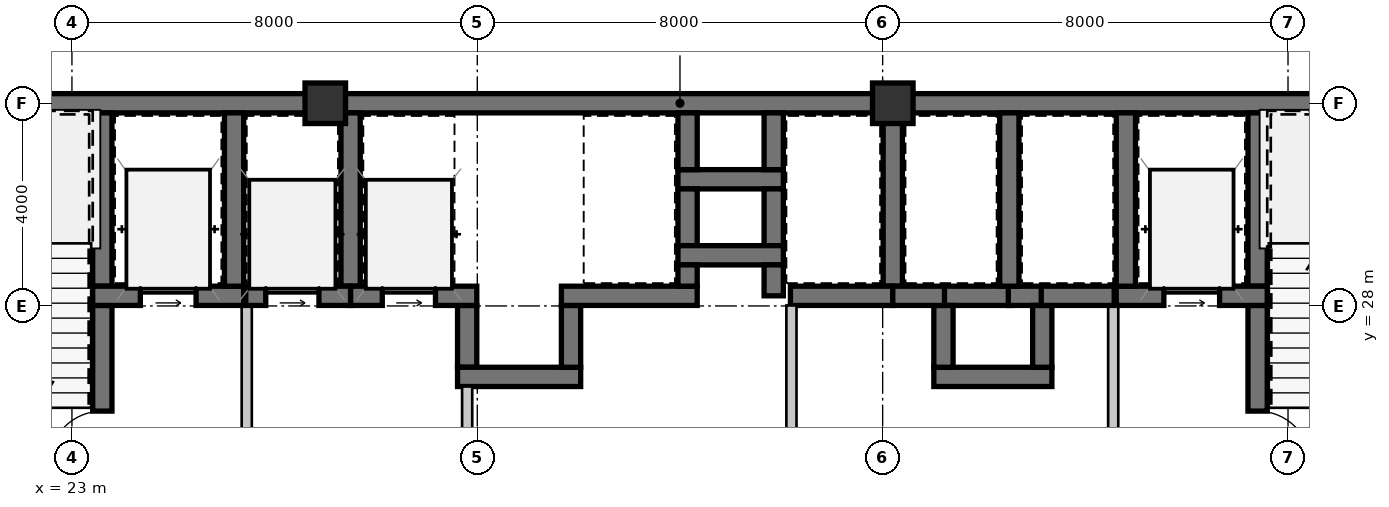
"""IFC4 building model, lengths in metres.
Left out: names, types, materials, properties, quantities, classifications, styles, units other than length and angle.
Written with IfcOpenShell. Run it as: python <this file> out.ifc"""

import sys

from ifc_helpers import new_model, si_unit, direction, frame, frame_2d, origin, origin_2d, place, context, subcontext, project, spatial, rectangle, extrude, source, transform, mapped, element, fill, save


model = new_model("IFC4")
c1 = context("Model", 3, precision=1e-05, world=origin(), true_north=direction((0.0, 1.0)))
c2 = subcontext(c1, "Body", "Model", "MODEL_VIEW")
j1 = project(units=[si_unit("LENGTHUNIT", "METRE"), si_unit("PLANEANGLEUNIT", "RADIAN")], contexts=[c1])
p1 = place(None, origin())
s1 = spatial("IfcSite", under=j1, at=p1, CompositionType="ELEMENT")
p2 = place(p1, origin())
s2 = spatial("IfcBuilding", under=s1, at=p2, CompositionType="ELEMENT")
p3 = place(p2, frame((0.0, 0.0, 32.55)))
s3 = spatial("IfcBuildingStorey", under=s2, at=p3, CompositionType="ELEMENT", Elevation=32.55)
m1 = source(origin(), c2, "Body", "SweptSolid", [
    extrude(rectangle(XDim=0.8, YDim=0.8, at=origin_2d()), origin(), (0.0, 0.0, 1.0), 3.15),
])
for number, where, z_axis, x_axis in (
    (1, (28.0, 32.0, 0.0), (0.0, 0.0, 1.0), (1.0, 0.0, 0.0)),
    (2, (39.2, 32.0, 0.0), (0.0, 0.0, 1.0), (1.0, 0.0, 0.0)),
):
    element("IfcColumn", number, at=place(p3, frame(where, z_axis=z_axis, x_axis=x_axis)), inside=s3, PredefinedType="COLUMN", context=c2, shape_type="MappedRepresentation", body=[
        mapped(m1, transform((0.0, 0.0, 0.0), scale=1.0)),
    ])
m2 = source(origin(), c2, "Body", "SweptSolid", [
    extrude(rectangle(XDim=9.19, YDim=0.38, at=frame_2d((4.595, 0.0))), origin(), (0.0, 0.0, 1.0), 2.93),
])
p4 = place(p3, frame((18.81, 32.0, 0.0), z_axis=(0.0, 0.0, 1.0), x_axis=(1.0, 0.0, 0.0)))
e3 = element("IfcWall", 3, at=p4, inside=s3, PredefinedType="SHEAR", context=c2, shape_type="MappedRepresentation", body=[
    mapped(m2, transform((0.0, 0.0, 0.0), scale=1.0)),
])
m3 = source(origin(), c2, "Body", "SweptSolid", [
    extrude(rectangle(XDim=11.2, YDim=0.38, at=frame_2d((5.6, 0.0))), origin(), (0.0, 0.0, 1.0), 2.93),
])
p5 = place(p3, frame((28.0, 32.0, 0.0), z_axis=(0.0, 0.0, 1.0), x_axis=(1.0, 0.0, 0.0)))
e4 = element("IfcWall", 4, at=p5, inside=s3, PredefinedType="SHEAR", context=c2, shape_type="MappedRepresentation", body=[
    mapped(m3, transform((0.0, 0.0, 0.0), scale=1.0)),
])
m4 = source(origin(), c2, "Body", "SweptSolid", [
    extrude(rectangle(XDim=11.99, YDim=0.38, at=frame_2d((5.995, 0.0))), origin(), (0.0, 0.0, 1.0), 2.93),
])
p6 = place(p3, frame((39.2, 32.0, 0.0), z_axis=(0.0, 0.0, 1.0), x_axis=(1.0, 0.0, 0.0)))
e5 = element("IfcWall", 5, at=p6, inside=s3, PredefinedType="SHEAR", context=c2, shape_type="MappedRepresentation", body=[
    mapped(m4, transform((0.0, 0.0, 0.0), scale=1.0)),
])
m5 = source(origin(), c2, "Body", "SweptSolid", [
    extrude(rectangle(XDim=3.42, YDim=0.38, at=frame_2d((1.71, 0.0))), origin(), (0.0, 0.0, 1.0), 2.93),
])
p7 = place(p3, frame((23.6, 28.39, 0.0), z_axis=(0.0, 0.0, 1.0), x_axis=(0.0, 1.0, 0.0)))
e6 = element("IfcWall", 6, at=p7, inside=s3, PredefinedType="SHEAR", context=c2, shape_type="MappedRepresentation", body=[
    mapped(m5, transform((0.0, 0.0, 0.0), scale=1.0)),
])
m6 = source(origin(), c2, "Body", "SweptSolid", [
    extrude(rectangle(XDim=3.82, YDim=0.38, at=frame_2d((1.91, 0.0))), origin(), (0.0, 0.0, 1.0), 2.93),
])
p8 = place(p3, frame((23.6, 24.19, 0.0), z_axis=(0.0, 0.0, 1.0), x_axis=(0.0, 1.0, 0.0)))
e7 = element("IfcWall", 7, at=p8, inside=s3, PredefinedType="SHEAR", context=c2, shape_type="MappedRepresentation", body=[
    mapped(m6, transform((0.0, 0.0, 0.0), scale=1.0)),
])
m7 = source(origin(), c2, "Body", "SweptSolid", [
    extrude(rectangle(XDim=1.05, YDim=2.1, at=frame_2d((0.525, 1.05))), frame((0.0, 0.2, 0.0), z_axis=(0.0, -1.0, 0.0), x_axis=(1.0, 0.0, 0.0)), (0.0, 0.0, 1.0), 0.4),
])
p9 = place(p8, frame((0.685, 0.0, 0.0)))
e8 = element("IfcOpeningElement", 8, at=p9, cuts=e7, PredefinedType="OPENING", context=c2, shape_type="MappedRepresentation", body=[
    mapped(m7, transform((0.0, 0.0, 0.0), scale=1.0)),
])
m8 = source(origin(), c2, "Body", "SweptSolid", [
    extrude(rectangle(XDim=2.98, YDim=0.38, at=frame_2d((1.49, 0.0))), origin(), (0.0, 0.0, 1.0), 2.93),
])
p10 = place(p3, frame((23.41, 28.2, 0.0), z_axis=(0.0, 0.0, 1.0), x_axis=(1.0, 0.0, 0.0)))
e9 = element("IfcWall", 9, at=p10, inside=s3, PredefinedType="SHEAR", context=c2, shape_type="MappedRepresentation", body=[
    mapped(m8, transform((0.0, 0.0, 0.0), scale=1.0)),
])
m9 = source(origin(), c2, "Body", "SweptSolid", [
    extrude(rectangle(XDim=1.1, YDim=2.15, at=frame_2d((0.55, 1.075))), frame((0.0, 0.2, 0.0), z_axis=(0.0, -1.0, 0.0), x_axis=(1.0, 0.0, 0.0)), (0.0, 0.0, 1.0), 0.4),
])
p11 = place(p10, frame((0.94, 0.0, 0.0)))
e10 = element("IfcOpeningElement", 10, at=p11, cuts=e9, PredefinedType="OPENING", context=c2, shape_type="MappedRepresentation", body=[
    mapped(m9, transform((0.0, 0.0, 0.0), scale=1.0)),
])
p12 = place(p3, frame((26.2, 28.39, 0.0), z_axis=(0.0, 0.0, 1.0), x_axis=(0.0, 1.0, 0.0)))
e11 = element("IfcWall", 11, at=p12, inside=s3, PredefinedType="SHEAR", context=c2, shape_type="MappedRepresentation", body=[
    mapped(m5, transform((0.0, 0.0, 0.0), scale=1.0)),
])
m10 = source(origin(), c2, "Body", "SweptSolid", [
    extrude(rectangle(XDim=3.91, YDim=0.2, at=frame_2d((1.955, 0.0))), origin(), (0.0, 0.0, 1.0), 2.93),
])
p13 = place(p3, frame((26.45, 24.1, 0.0), z_axis=(0.0, 0.0, 1.0), x_axis=(0.0, 1.0, 0.0)))
e12 = element("IfcWall", 12, at=p13, inside=s3, PredefinedType="SOLIDWALL", context=c2, shape_type="MappedRepresentation", body=[
    mapped(m10, transform((0.0, 0.0, 0.0), scale=1.0)),
])
p14 = place(p3, frame((46.4, 31.81, 0.0), z_axis=(0.0, 0.0, 1.0), x_axis=(0.0, -1.0, 0.0)))
e13 = element("IfcWall", 13, at=p14, inside=s3, PredefinedType="SHEAR", context=c2, shape_type="MappedRepresentation", body=[
    mapped(m5, transform((0.0, 0.0, 0.0), scale=1.0)),
])
p15 = place(p3, frame((46.4, 28.01, 0.0), z_axis=(0.0, 0.0, 1.0), x_axis=(0.0, -1.0, 0.0)))
e14 = element("IfcWall", 14, at=p15, inside=s3, PredefinedType="SHEAR", context=c2, shape_type="MappedRepresentation", body=[
    mapped(m6, transform((0.0, 0.0, 0.0), scale=1.0)),
])
p16 = place(p15, frame((2.085, 0.0, 0.0)))
e15 = element("IfcOpeningElement", 15, at=p16, cuts=e14, PredefinedType="OPENING", context=c2, shape_type="MappedRepresentation", body=[
    mapped(m7, transform((0.0, 0.0, 0.0), scale=1.0)),
])
p17 = place(p3, frame((43.61, 28.2, 0.0), z_axis=(0.0, 0.0, 1.0), x_axis=(1.0, 0.0, 0.0)))
e16 = element("IfcWall", 16, at=p17, inside=s3, PredefinedType="SHEAR", context=c2, shape_type="MappedRepresentation", body=[
    mapped(m8, transform((0.0, 0.0, 0.0), scale=1.0)),
])
p18 = place(p17, frame((0.94, 0.0, 0.0)))
e17 = element("IfcOpeningElement", 17, at=p18, cuts=e16, PredefinedType="OPENING", context=c2, shape_type="MappedRepresentation", body=[
    mapped(m9, transform((0.0, 0.0, 0.0), scale=1.0)),
])
p19 = place(p3, frame((43.8, 31.81, 0.0), z_axis=(0.0, 0.0, 1.0), x_axis=(0.0, -1.0, 0.0)))
e18 = element("IfcWall", 18, at=p19, inside=s3, PredefinedType="SHEAR", context=c2, shape_type="MappedRepresentation", body=[
    mapped(m5, transform((0.0, 0.0, 0.0), scale=1.0)),
])
p20 = place(p3, frame((43.55, 28.01, 0.0), z_axis=(0.0, 0.0, 1.0), x_axis=(0.0, -1.0, 0.0)))
e19 = element("IfcWall", 19, at=p20, inside=s3, PredefinedType="SOLIDWALL", context=c2, shape_type="MappedRepresentation", body=[
    mapped(m10, transform((0.0, 0.0, 0.0), scale=1.0)),
])
m11 = source(origin(), c2, "Body", "SweptSolid", [
    extrude(rectangle(XDim=2.08, YDim=0.38, at=frame_2d((1.04, 0.0))), origin(), (0.0, 0.0, 1.0), 2.93),
])
p21 = place(p3, frame((34.96, 30.5, 0.0), z_axis=(0.0, 0.0, 1.0), x_axis=(1.0, 0.0, 0.0)))
e20 = element("IfcWall", 20, at=p21, inside=s3, PredefinedType="SHEAR", context=c2, shape_type="MappedRepresentation", body=[
    mapped(m11, transform((0.0, 0.0, 0.0), scale=1.0)),
])
m12 = source(origin(), c2, "Body", "SweptSolid", [
    extrude(rectangle(XDim=1.12, YDim=0.38, at=frame_2d((0.56, 0.0))), origin(), (0.0, 0.0, 1.0), 2.93),
])
for number, where, z_axis, x_axis in (
    (21, (35.15, 31.81, 0.0), (0.0, 0.0, 1.0), (0.0, -1.0, 0.0)),
    (22, (36.85, 30.69, 0.0), (0.0, 0.0, 1.0), (0.0, 1.0, 0.0)),
    (23, (35.15, 30.31, 0.0), (0.0, 0.0, 1.0), (0.0, -1.0, 0.0)),
    (24, (36.85, 29.19, 0.0), (0.0, 0.0, 1.0), (0.0, 1.0, 0.0)),
):
    element("IfcWall", number, at=place(p3, frame(where, z_axis=z_axis, x_axis=x_axis)), inside=s3, PredefinedType="SHEAR", context=c2, shape_type="MappedRepresentation", body=[
        mapped(m12, transform((0.0, 0.0, 0.0), scale=1.0)),
    ])
p22 = place(p3, frame((34.96, 29.0, 0.0), z_axis=(0.0, 0.0, 1.0), x_axis=(1.0, 0.0, 0.0)))
e25 = element("IfcWall", 25, at=p22, inside=s3, PredefinedType="SHEAR", context=c2, shape_type="MappedRepresentation", body=[
    mapped(m11, transform((0.0, 0.0, 0.0), scale=1.0)),
])
m13 = source(origin(), c2, "Body", "SweptSolid", [
    extrude(rectangle(XDim=1.22, YDim=0.38, at=frame_2d((0.61, 0.0))), origin(), (0.0, 0.0, 1.0), 2.93),
])
p23 = place(p3, frame((30.8, 28.01, 0.0), z_axis=(0.0, 0.0, 1.0), x_axis=(0.0, -1.0, 0.0)))
e26 = element("IfcWall", 26, at=p23, inside=s3, PredefinedType="SHEAR", context=c2, shape_type="MappedRepresentation", body=[
    mapped(m13, transform((0.0, 0.0, 0.0), scale=1.0)),
])
m14 = source(origin(), c2, "Body", "SweptSolid", [
    extrude(rectangle(XDim=2.43, YDim=0.38, at=frame_2d((1.215, 0.0))), origin(), (0.0, 0.0, 1.0), 2.93),
])
p24 = place(p3, frame((30.61, 26.6, 0.0), z_axis=(0.0, 0.0, 1.0), x_axis=(1.0, 0.0, 0.0)))
e27 = element("IfcWall", 27, at=p24, inside=s3, PredefinedType="SHEAR", context=c2, shape_type="MappedRepresentation", body=[
    mapped(m14, transform((0.0, 0.0, 0.0), scale=1.0)),
])
p25 = place(p3, frame((32.85, 26.79, 0.0), z_axis=(0.0, 0.0, 1.0), x_axis=(0.0, 1.0, 0.0)))
e28 = element("IfcWall", 28, at=p25, inside=s3, PredefinedType="SHEAR", context=c2, shape_type="MappedRepresentation", body=[
    mapped(m13, transform((0.0, 0.0, 0.0), scale=1.0)),
])
m15 = source(origin(), c2, "Body", "SweptSolid", [
    extrude(rectangle(XDim=1.32, YDim=0.38, at=frame_2d((0.66, 0.0))), origin(), (0.0, 0.0, 1.0), 2.93),
])
p26 = place(p3, frame((41.52, 28.2, 0.0), z_axis=(0.0, 0.0, 1.0), x_axis=(-1.0, 0.0, 0.0)))
e29 = element("IfcWall", 29, at=p26, inside=s3, PredefinedType="SHEAR", context=c2, shape_type="MappedRepresentation", body=[
    mapped(m15, transform((0.0, 0.0, 0.0), scale=1.0)),
])
m16 = source(origin(), c2, "Body", "SweptSolid", [
    extrude(rectangle(XDim=0.67, YDim=0.38, at=frame_2d((0.335, 0.0))), origin(), (0.0, 0.0, 1.0), 2.93),
])
p27 = place(p3, frame((42.15, 28.2, 0.0), z_axis=(0.0, 0.0, 1.0), x_axis=(-1.0, 0.0, 0.0)))
e30 = element("IfcWall", 30, at=p27, inside=s3, PredefinedType="SHEAR", context=c2, shape_type="MappedRepresentation", body=[
    mapped(m16, transform((0.0, 0.0, 0.0), scale=1.0)),
])
m17 = source(origin(), c2, "Body", "SweptSolid", [
    extrude(rectangle(XDim=2.33, YDim=0.38, at=frame_2d((1.165, 0.0))), origin(), (0.0, 0.0, 1.0), 2.93),
])
p28 = place(p3, frame((40.01, 26.6, 0.0), z_axis=(0.0, 0.0, 1.0), x_axis=(1.0, 0.0, 0.0)))
e31 = element("IfcWall", 31, at=p28, inside=s3, PredefinedType="SHEAR", context=c2, shape_type="MappedRepresentation", body=[
    mapped(m17, transform((0.0, 0.0, 0.0), scale=1.0)),
])
for number, where, z_axis, x_axis in (
    (32, (40.2, 28.01, 0.0), (0.0, 0.0, 1.0), (0.0, -1.0, 0.0)),
    (33, (42.15, 26.79, 0.0), (0.0, 0.0, 1.0), (0.0, 1.0, 0.0)),
):
    element("IfcWall", number, at=place(p3, frame(where, z_axis=z_axis, x_axis=x_axis)), inside=s3, PredefinedType="SHEAR", context=c2, shape_type="MappedRepresentation", body=[
        mapped(m13, transform((0.0, 0.0, 0.0), scale=1.0)),
    ])
p29 = place(p3, frame((28.5, 28.39, 0.0), z_axis=(0.0, 0.0, 1.0), x_axis=(0.0, 1.0, 0.0)))
e34 = element("IfcWall", 34, at=p29, inside=s3, PredefinedType="SHEAR", context=c2, shape_type="MappedRepresentation", body=[
    mapped(m5, transform((0.0, 0.0, 0.0), scale=1.0)),
])
m18 = source(origin(), c2, "Body", "SweptSolid", [
    extrude(rectangle(XDim=2.07, YDim=0.38, at=frame_2d((1.035, 0.0))), origin(), (0.0, 0.0, 1.0), 2.93),
])
p30 = place(p3, frame((26.43, 28.2, 0.0), z_axis=(0.0, 0.0, 1.0), x_axis=(1.0, 0.0, 0.0)))
e35 = element("IfcWall", 35, at=p30, inside=s3, PredefinedType="SHEAR", context=c2, shape_type="MappedRepresentation", body=[
    mapped(m18, transform((0.0, 0.0, 0.0), scale=1.0)),
])
m19 = source(origin(), c2, "Body", "SweptSolid", [
    extrude(rectangle(XDim=1.05, YDim=2.15, at=frame_2d((0.525, 1.075))), frame((0.0, 0.2, 0.0), z_axis=(0.0, -1.0, 0.0), x_axis=(1.0, 0.0, 0.0)), (0.0, 0.0, 1.0), 0.4),
])
p31 = place(p30, frame((0.395, 0.0, 0.0)))
e36 = element("IfcOpeningElement", 36, at=p31, cuts=e35, PredefinedType="OPENING", context=c2, shape_type="MappedRepresentation", body=[
    mapped(m19, transform((0.0, 0.0, 0.0), scale=1.0)),
])
m20 = source(origin(), c2, "Body", "SweptSolid", [
    extrude(rectangle(XDim=2.49, YDim=0.38, at=frame_2d((1.245, 0.0))), origin(), (0.0, 0.0, 1.0), 2.93),
])
p32 = place(p3, frame((28.5, 28.2, 0.0), z_axis=(0.0, 0.0, 1.0), x_axis=(1.0, 0.0, 0.0)))
e37 = element("IfcWall", 37, at=p32, inside=s3, PredefinedType="SHEAR", context=c2, shape_type="MappedRepresentation", body=[
    mapped(m20, transform((0.0, 0.0, 0.0), scale=1.0)),
])
p33 = place(p32, frame((0.625, 0.0, 0.0)))
e38 = element("IfcOpeningElement", 38, at=p33, cuts=e37, PredefinedType="OPENING", context=c2, shape_type="MappedRepresentation", body=[
    mapped(m19, transform((0.0, 0.0, 0.0), scale=1.0)),
])
m21 = source(origin(), c2, "Body", "SweptSolid", [
    extrude(rectangle(XDim=2.31, YDim=0.2, at=frame_2d((1.155, 0.0))), origin(), (0.0, 0.0, 1.0), 2.93),
])
p34 = place(p3, frame((30.8, 26.41, 0.0), z_axis=(0.0, 0.0, 1.0), x_axis=(0.0, -1.0, 0.0)))
e39 = element("IfcWall", 39, at=p34, inside=s3, PredefinedType="SOLIDWALL", context=c2, shape_type="MappedRepresentation", body=[
    mapped(m21, transform((0.0, 0.0, 0.0), scale=1.0)),
])
m22 = source(origin(), c2, "Body", "SweptSolid", [
    extrude(rectangle(XDim=2.68, YDim=0.38, at=frame_2d((1.34, 0.0))), origin(), (0.0, 0.0, 1.0), 2.93),
])
p35 = place(p3, frame((32.66, 28.2, 0.0), z_axis=(0.0, 0.0, 1.0), x_axis=(1.0, 0.0, 0.0)))
e40 = element("IfcWall", 40, at=p35, inside=s3, PredefinedType="SHEAR", context=c2, shape_type="MappedRepresentation", body=[
    mapped(m22, transform((0.0, 0.0, 0.0), scale=1.0)),
])
m23 = source(origin(), c2, "Body", "SweptSolid", [
    extrude(rectangle(XDim=0.42, YDim=0.38, at=frame_2d((0.21, 0.0))), origin(), (0.0, 0.0, 1.0), 2.93),
])
p36 = place(p3, frame((35.15, 28.39, 0.0), z_axis=(0.0, 0.0, 1.0), x_axis=(0.0, 1.0, 0.0)))
e41 = element("IfcWall", 41, at=p36, inside=s3, PredefinedType="SHEAR", context=c2, shape_type="MappedRepresentation", body=[
    mapped(m23, transform((0.0, 0.0, 0.0), scale=1.0)),
])
p37 = place(p3, frame((39.2, 28.39, 0.0), z_axis=(0.0, 0.0, 1.0), x_axis=(0.0, 1.0, 0.0)))
e42 = element("IfcWall", 42, at=p37, inside=s3, PredefinedType="SHEAR", context=c2, shape_type="MappedRepresentation", body=[
    mapped(m5, transform((0.0, 0.0, 0.0), scale=1.0)),
])
m24 = source(origin(), c2, "Body", "SweptSolid", [
    extrude(rectangle(XDim=0.61, YDim=0.38, at=frame_2d((0.305, 0.0))), origin(), (0.0, 0.0, 1.0), 2.93),
])
p38 = place(p3, frame((36.85, 28.81, 0.0), z_axis=(0.0, 0.0, 1.0), x_axis=(0.0, -1.0, 0.0)))
e43 = element("IfcWall", 43, at=p38, inside=s3, PredefinedType="SHEAR", context=c2, shape_type="MappedRepresentation", body=[
    mapped(m24, transform((0.0, 0.0, 0.0), scale=1.0)),
])
m25 = source(origin(), c2, "Body", "SweptSolid", [
    extrude(rectangle(XDim=2.02, YDim=0.38, at=frame_2d((1.01, 0.0))), origin(), (0.0, 0.0, 1.0), 2.93),
])
p39 = place(p3, frame((37.18, 28.2, 0.0), z_axis=(0.0, 0.0, 1.0), x_axis=(1.0, 0.0, 0.0)))
e44 = element("IfcWall", 44, at=p39, inside=s3, PredefinedType="SHEAR", context=c2, shape_type="MappedRepresentation", body=[
    mapped(m25, transform((0.0, 0.0, 0.0), scale=1.0)),
])
p40 = place(p3, frame((41.5, 28.39, 0.0), z_axis=(0.0, 0.0, 1.0), x_axis=(0.0, 1.0, 0.0)))
e45 = element("IfcWall", 45, at=p40, inside=s3, PredefinedType="SHEAR", context=c2, shape_type="MappedRepresentation", body=[
    mapped(m5, transform((0.0, 0.0, 0.0), scale=1.0)),
])
m26 = source(origin(), c2, "Body", "SweptSolid", [
    extrude(rectangle(XDim=1.02, YDim=0.38, at=frame_2d((0.51, 0.0))), origin(), (0.0, 0.0, 1.0), 2.93),
])
p41 = place(p3, frame((39.2, 28.2, 0.0), z_axis=(0.0, 0.0, 1.0), x_axis=(1.0, 0.0, 0.0)))
e46 = element("IfcWall", 46, at=p41, inside=s3, PredefinedType="SHEAR", context=c2, shape_type="MappedRepresentation", body=[
    mapped(m26, transform((0.0, 0.0, 0.0), scale=1.0)),
])
m27 = source(origin(), c2, "Body", "SweptSolid", [
    extrude(rectangle(XDim=1.44, YDim=0.38, at=frame_2d((0.72, 0.0))), origin(), (0.0, 0.0, 1.0), 2.93),
])
p42 = place(p3, frame((42.13, 28.2, 0.0), z_axis=(0.0, 0.0, 1.0), x_axis=(1.0, 0.0, 0.0)))
e47 = element("IfcWall", 47, at=p42, inside=s3, PredefinedType="SHEAR", context=c2, shape_type="MappedRepresentation", body=[
    mapped(m27, transform((0.0, 0.0, 0.0), scale=1.0)),
])
p43 = place(p3, frame((37.2, 28.01, 0.0), z_axis=(0.0, 0.0, 1.0), x_axis=(0.0, -1.0, 0.0)))
e48 = element("IfcWall", 48, at=p43, inside=s3, PredefinedType="SOLIDWALL", context=c2, shape_type="MappedRepresentation", body=[
    mapped(m10, transform((0.0, 0.0, 0.0), scale=1.0)),
])
m28 = source(origin(), c2, "Body", "SweptSolid", [
    extrude(rectangle(XDim=1.05, YDim=2.1, at=frame_2d((0.525, 1.05))), frame((0.0, 0.025, 0.0), z_axis=(0.0, -1.0, 0.0), x_axis=(1.0, 0.0, 0.0)), (0.0, 0.0, 1.0), 0.05),
])
p44 = place(p9, origin())
e49 = element("IfcDoor", 49, at=p44, inside=s3, OperationType="SINGLE_SWING_LEFT", PredefinedType="DOOR", context=c2, shape_type="MappedRepresentation", body=[
    mapped(m28, transform((0.0, 0.0, 0.0), scale=1.0)),
])
fill(e8, e49)
m29 = source(origin(), c2, "Body", "SweptSolid", [
    extrude(rectangle(XDim=1.1, YDim=2.15, at=frame_2d((0.55, 1.075))), frame((0.0, 0.025, 0.0), z_axis=(0.0, -1.0, 0.0), x_axis=(1.0, 0.0, 0.0)), (0.0, 0.0, 1.0), 0.05),
])
p45 = place(p11, origin())
e50 = element("IfcDoor", 50, at=p45, inside=s3, OperationType="SLIDING_TO_LEFT", PredefinedType="DOOR", context=c2, shape_type="MappedRepresentation", body=[
    mapped(m29, transform((0.0, 0.0, 0.0), scale=1.0)),
])
fill(e10, e50)
p46 = place(p16, origin())
e51 = element("IfcDoor", 51, at=p46, inside=s3, OperationType="SINGLE_SWING_RIGHT", PredefinedType="DOOR", context=c2, shape_type="MappedRepresentation", body=[
    mapped(m28, transform((0.0, 0.0, 0.0), scale=1.0)),
])
fill(e15, e51)
p47 = place(p18, origin())
e52 = element("IfcDoor", 52, at=p47, inside=s3, OperationType="SLIDING_TO_LEFT", PredefinedType="DOOR", context=c2, shape_type="MappedRepresentation", body=[
    mapped(m29, transform((0.0, 0.0, 0.0), scale=1.0)),
])
fill(e17, e52)
m30 = source(origin(), c2, "Body", "SweptSolid", [
    extrude(rectangle(XDim=1.05, YDim=2.15, at=frame_2d((0.525, 1.075))), frame((0.0, 0.025, 0.0), z_axis=(0.0, -1.0, 0.0), x_axis=(1.0, 0.0, 0.0)), (0.0, 0.0, 1.0), 0.05),
])
p48 = place(p31, origin())
e53 = element("IfcDoor", 53, at=p48, inside=s3, OperationType="SLIDING_TO_LEFT", PredefinedType="DOOR", context=c2, shape_type="MappedRepresentation", body=[
    mapped(m30, transform((0.0, 0.0, 0.0), scale=1.0)),
])
fill(e36, e53)
p49 = place(p33, origin())
e54 = element("IfcDoor", 54, at=p49, inside=s3, OperationType="SLIDING_TO_LEFT", PredefinedType="DOOR", context=c2, shape_type="MappedRepresentation", body=[
    mapped(m30, transform((0.0, 0.0, 0.0), scale=1.0)),
])
fill(e38, e54)
save(model, sys.argv[1])
